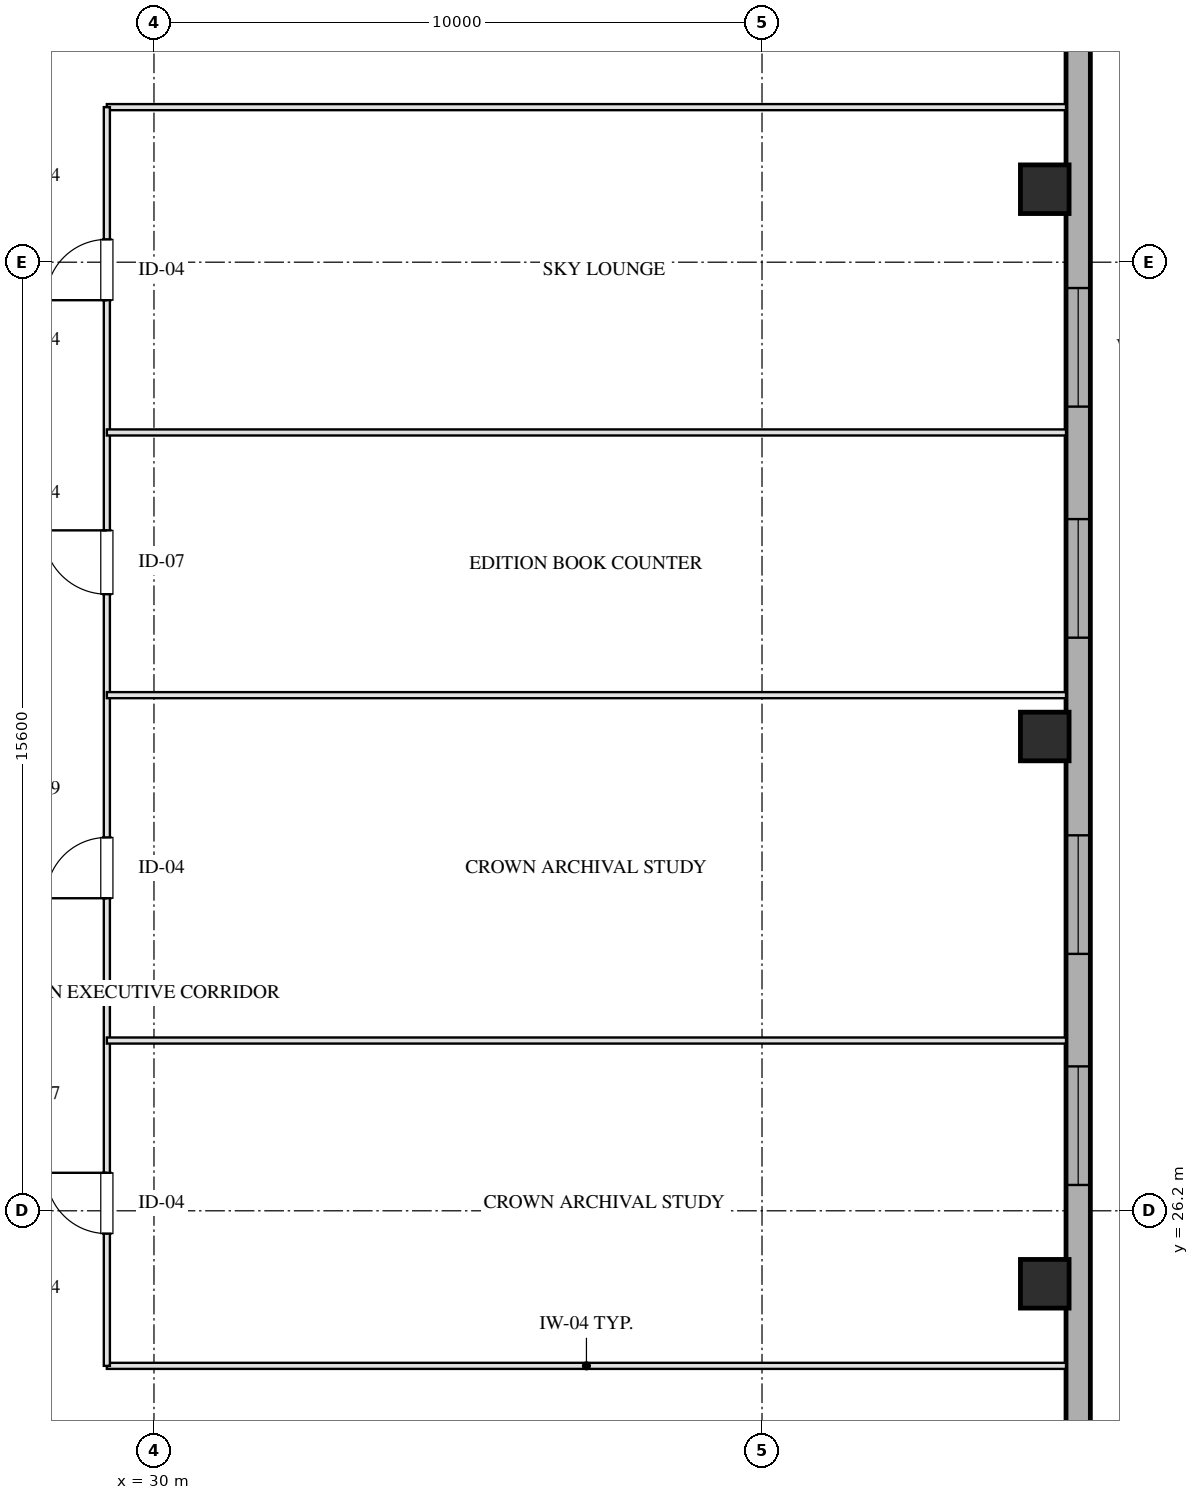
"""IFC4 building model, lengths in metres.
Left out: names, types, materials, properties, quantities, classifications, styles, units other than length and angle.
Written with IfcOpenShell. Run it as: python <this file> out.ifc"""

import sys

from ifc_helpers import new_model, si_unit, direction, frame, frame_2d, origin, origin_2d, place, context, subcontext, project, spatial, rectangle, hollow_rectangle, extrude, element, fill, save


model = new_model("IFC4")
c1 = context("Model", 3, precision=1e-05, world=origin(), true_north=direction((0.0, 1.0)))
c2 = subcontext(c1, "Body", "Model", "MODEL_VIEW")
j1 = project(units=[si_unit("LENGTHUNIT", "METRE"), si_unit("PLANEANGLEUNIT", "RADIAN")], contexts=[c1])
p1 = place(None, origin())
s1 = spatial("IfcSite", under=j1, at=p1, CompositionType="ELEMENT")
p2 = place(p1, origin())
s2 = spatial("IfcBuilding", under=s1, at=p2, CompositionType="ELEMENT")
p3 = place(p2, frame((0.0, 0.0, 263.2)))
s3 = spatial("IfcBuildingStorey", under=s2, at=p3, CompositionType="ELEMENT", Elevation=263.2)
for number, where, z_axis, x_axis in (
    (1, (44.65, 25.0, 0.0), (0.0, 0.0, 1.0), (1.0, 0.0, 0.0)),
    (2, (44.65, 34.0, 0.0), (0.0, 0.0, 1.0), (1.0, 0.0, 0.0)),
    (3, (44.65, 43.0, 0.0), (0.0, 0.0, 1.0), (1.0, 0.0, 0.0)),
):
    element("IfcColumn", number, at=place(p3, frame(where, z_axis=z_axis, x_axis=x_axis)), inside=s3, PredefinedType="COLUMN", context=c2, shape_type="SweptSolid", body=[
        extrude(hollow_rectangle(XDim=0.8, YDim=0.8, WallThickness=0.028, at=origin_2d()), origin(), (0.0, 0.0, 1.0), 3.201),
    ])
p4 = place(p3, frame((45.2, 54.9, 0.0), z_axis=(0.0, 0.0, 1.0), x_axis=(0.0, -1.0, 0.0)))
e4 = element("IfcWall", 4, at=p4, inside=s3, PredefinedType="SOLIDWALL", context=c2, shape_type="SweptSolid", body=[
    extrude(rectangle(XDim=41.8, YDim=0.4, at=frame_2d((20.9, 0.0))), origin(), (0.0, 0.0, 1.0), 2.36),
])
p5 = place(p4, frame((26.325, 0.0, 0.75)))
e5 = element("IfcOpeningElement", 5, at=p5, cuts=e4, PredefinedType="OPENING", context=c2, shape_type="SweptSolid", body=[
    extrude(rectangle(XDim=1.95, YDim=1.21, at=frame_2d((0.975, 0.605))), frame((0.0, 0.21, 0.0), z_axis=(0.0, -1.0, 0.0), x_axis=(1.0, 0.0, 0.0)), (0.0, 0.0, 1.0), 0.42),
])
p6 = place(p4, frame((22.525, 0.0, 0.75)))
e6 = element("IfcOpeningElement", 6, at=p6, cuts=e4, PredefinedType="OPENING", context=c2, shape_type="SweptSolid", body=[
    extrude(rectangle(XDim=1.95, YDim=1.21, at=frame_2d((0.975, 0.605))), frame((0.0, 0.21, 0.0), z_axis=(0.0, -1.0, 0.0), x_axis=(1.0, 0.0, 0.0)), (0.0, 0.0, 1.0), 0.42),
])
p7 = place(p4, frame((17.325, 0.0, 0.75)))
e7 = element("IfcOpeningElement", 7, at=p7, cuts=e4, PredefinedType="OPENING", context=c2, shape_type="SweptSolid", body=[
    extrude(rectangle(XDim=1.95, YDim=1.21, at=frame_2d((0.975, 0.605))), frame((0.0, 0.21, 0.0), z_axis=(0.0, -1.0, 0.0), x_axis=(1.0, 0.0, 0.0)), (0.0, 0.0, 1.0), 0.42),
])
p8 = place(p4, frame((13.525, 0.0, 0.75)))
e8 = element("IfcOpeningElement", 8, at=p8, cuts=e4, PredefinedType="OPENING", context=c2, shape_type="SweptSolid", body=[
    extrude(rectangle(XDim=1.95, YDim=1.21, at=frame_2d((0.975, 0.605))), frame((0.0, 0.21, 0.0), z_axis=(0.0, -1.0, 0.0), x_axis=(1.0, 0.0, 0.0)), (0.0, 0.0, 1.0), 0.42),
])
for number, where, z_axis, x_axis in (
    (9, (29.225, 23.65, 0.0), (0.0, 0.0, 1.0), (1.0, 0.0, 0.0)),
    (10, (29.225, 44.35, 0.0), (0.0, 0.0, 1.0), (1.0, 0.0, 0.0)),
):
    element("IfcWall", number, at=place(p3, frame(where, z_axis=z_axis, x_axis=x_axis)), inside=s3, PredefinedType="MOVABLE", context=c2, shape_type="SweptSolid", body=[
        extrude(rectangle(XDim=15.775, YDim=0.1, at=frame_2d((7.887, 0.0))), origin(), (0.0, 0.0, 1.0), 2.925),
    ])
p9 = place(p3, frame((29.225, 23.65, 0.0), z_axis=(0.0, 0.0, 1.0), x_axis=(0.0, 1.0, 0.0)))
e11 = element("IfcWall", 11, at=p9, inside=s3, PredefinedType="MOVABLE", context=c2, shape_type="SweptSolid", body=[
    extrude(rectangle(XDim=20.7, YDim=0.1, at=frame_2d((10.35, 0.0))), origin(), (0.0, 0.0, 1.0), 2.925),
])
p10 = place(p9, frame((2.175, 0.0, 0.0)))
e12 = element("IfcOpeningElement", 12, at=p10, cuts=e11, PredefinedType="OPENING", context=c2, shape_type="SweptSolid", body=[
    extrude(rectangle(XDim=1.0, YDim=2.05, at=frame_2d((0.5, 1.025))), frame((0.0, 0.06, 0.0), z_axis=(0.0, -1.0, 0.0), x_axis=(1.0, 0.0, 0.0)), (0.0, 0.0, 1.0), 0.12),
])
p11 = place(p9, frame((7.69, 0.0, 0.0)))
e13 = element("IfcOpeningElement", 13, at=p11, cuts=e11, PredefinedType="OPENING", context=c2, shape_type="SweptSolid", body=[
    extrude(rectangle(XDim=1.0, YDim=2.05, at=frame_2d((0.5, 1.025))), frame((0.0, 0.06, 0.0), z_axis=(0.0, -1.0, 0.0), x_axis=(1.0, 0.0, 0.0)), (0.0, 0.0, 1.0), 0.12),
])
p12 = place(p9, frame((12.69, 0.0, 0.0)))
e14 = element("IfcOpeningElement", 14, at=p12, cuts=e11, PredefinedType="OPENING", context=c2, shape_type="SweptSolid", body=[
    extrude(rectangle(XDim=1.05, YDim=2.05, at=frame_2d((0.525, 1.025))), frame((0.0, 0.06, 0.0), z_axis=(0.0, -1.0, 0.0), x_axis=(1.0, 0.0, 0.0)), (0.0, 0.0, 1.0), 0.12),
])
p13 = place(p9, frame((17.525, 0.0, 0.0)))
e15 = element("IfcOpeningElement", 15, at=p13, cuts=e11, PredefinedType="OPENING", context=c2, shape_type="SweptSolid", body=[
    extrude(rectangle(XDim=1.0, YDim=2.05, at=frame_2d((0.5, 1.025))), frame((0.0, 0.06, 0.0), z_axis=(0.0, -1.0, 0.0), x_axis=(1.0, 0.0, 0.0)), (0.0, 0.0, 1.0), 0.12),
])
for number, where, z_axis, x_axis in (
    (16, (29.225, 29.0, 0.0), (0.0, 0.0, 1.0), (1.0, 0.0, 0.0)),
    (17, (29.225, 34.68, 0.0), (0.0, 0.0, 1.0), (1.0, 0.0, 0.0)),
    (18, (29.225, 39.0, 0.0), (0.0, 0.0, 1.0), (1.0, 0.0, 0.0)),
):
    element("IfcWall", number, at=place(p3, frame(where, z_axis=z_axis, x_axis=x_axis)), inside=s3, PredefinedType="MOVABLE", context=c2, shape_type="SweptSolid", body=[
        extrude(rectangle(XDim=15.775, YDim=0.1, at=frame_2d((7.887, 0.0))), origin(), (0.0, 0.0, 1.0), 2.925),
    ])
p14 = place(p5, origin())
e19 = element("IfcWindow", 19, at=p14, inside=s3, PartitioningType="TRIPLE_PANEL_VERTICAL", PredefinedType="WINDOW", context=c2, shape_type="SweptSolid", body=[
    extrude(rectangle(XDim=1.95, YDim=1.21, at=frame_2d((0.975, 0.605))), frame((0.0, 0.03, 0.0), z_axis=(0.0, -1.0, 0.0), x_axis=(1.0, 0.0, 0.0)), (0.0, 0.0, 1.0), 0.06),
])
fill(e5, e19)
p15 = place(p6, origin())
e20 = element("IfcWindow", 20, at=p15, inside=s3, PartitioningType="TRIPLE_PANEL_VERTICAL", PredefinedType="WINDOW", context=c2, shape_type="SweptSolid", body=[
    extrude(rectangle(XDim=1.95, YDim=1.21, at=frame_2d((0.975, 0.605))), frame((0.0, 0.03, 0.0), z_axis=(0.0, -1.0, 0.0), x_axis=(1.0, 0.0, 0.0)), (0.0, 0.0, 1.0), 0.06),
])
fill(e6, e20)
p16 = place(p7, origin())
e21 = element("IfcWindow", 21, at=p16, inside=s3, PartitioningType="TRIPLE_PANEL_VERTICAL", PredefinedType="WINDOW", context=c2, shape_type="SweptSolid", body=[
    extrude(rectangle(XDim=1.95, YDim=1.21, at=frame_2d((0.975, 0.605))), frame((0.0, 0.03, 0.0), z_axis=(0.0, -1.0, 0.0), x_axis=(1.0, 0.0, 0.0)), (0.0, 0.0, 1.0), 0.06),
])
fill(e7, e21)
p17 = place(p8, origin())
e22 = element("IfcWindow", 22, at=p17, inside=s3, PartitioningType="TRIPLE_PANEL_VERTICAL", PredefinedType="WINDOW", context=c2, shape_type="SweptSolid", body=[
    extrude(rectangle(XDim=1.95, YDim=1.21, at=frame_2d((0.975, 0.605))), frame((0.0, 0.03, 0.0), z_axis=(0.0, -1.0, 0.0), x_axis=(1.0, 0.0, 0.0)), (0.0, 0.0, 1.0), 0.06),
])
fill(e8, e22)
p18 = place(p10, origin())
e23 = element("IfcDoor", 23, at=p18, inside=s3, OperationType="SINGLE_SWING_RIGHT", PredefinedType="DOOR", context=c2, shape_type="SweptSolid", body=[
    extrude(rectangle(XDim=1.0, YDim=2.05, at=frame_2d((0.5, 1.025))), frame((0.0, 0.025, 0.0), z_axis=(0.0, -1.0, 0.0), x_axis=(1.0, 0.0, 0.0)), (0.0, 0.0, 1.0), 0.05),
])
fill(e12, e23)
p19 = place(p11, origin())
e24 = element("IfcDoor", 24, at=p19, inside=s3, OperationType="SINGLE_SWING_LEFT", PredefinedType="DOOR", context=c2, shape_type="SweptSolid", body=[
    extrude(rectangle(XDim=1.0, YDim=2.05, at=frame_2d((0.5, 1.025))), frame((0.0, 0.025, 0.0), z_axis=(0.0, -1.0, 0.0), x_axis=(1.0, 0.0, 0.0)), (0.0, 0.0, 1.0), 0.05),
])
fill(e13, e24)
p20 = place(p12, origin())
e25 = element("IfcDoor", 25, at=p20, inside=s3, OperationType="SINGLE_SWING_RIGHT", PredefinedType="DOOR", context=c2, shape_type="SweptSolid", body=[
    extrude(rectangle(XDim=1.05, YDim=2.05, at=frame_2d((0.525, 1.025))), frame((0.0, 0.025, 0.0), z_axis=(0.0, -1.0, 0.0), x_axis=(1.0, 0.0, 0.0)), (0.0, 0.0, 1.0), 0.05),
])
fill(e14, e25)
p21 = place(p13, origin())
e26 = element("IfcDoor", 26, at=p21, inside=s3, OperationType="SINGLE_SWING_LEFT", PredefinedType="DOOR", context=c2, shape_type="SweptSolid", body=[
    extrude(rectangle(XDim=1.0, YDim=2.05, at=frame_2d((0.5, 1.025))), frame((0.0, 0.025, 0.0), z_axis=(0.0, -1.0, 0.0), x_axis=(1.0, 0.0, 0.0)), (0.0, 0.0, 1.0), 0.05),
])
fill(e15, e26)
save(model, sys.argv[1])
